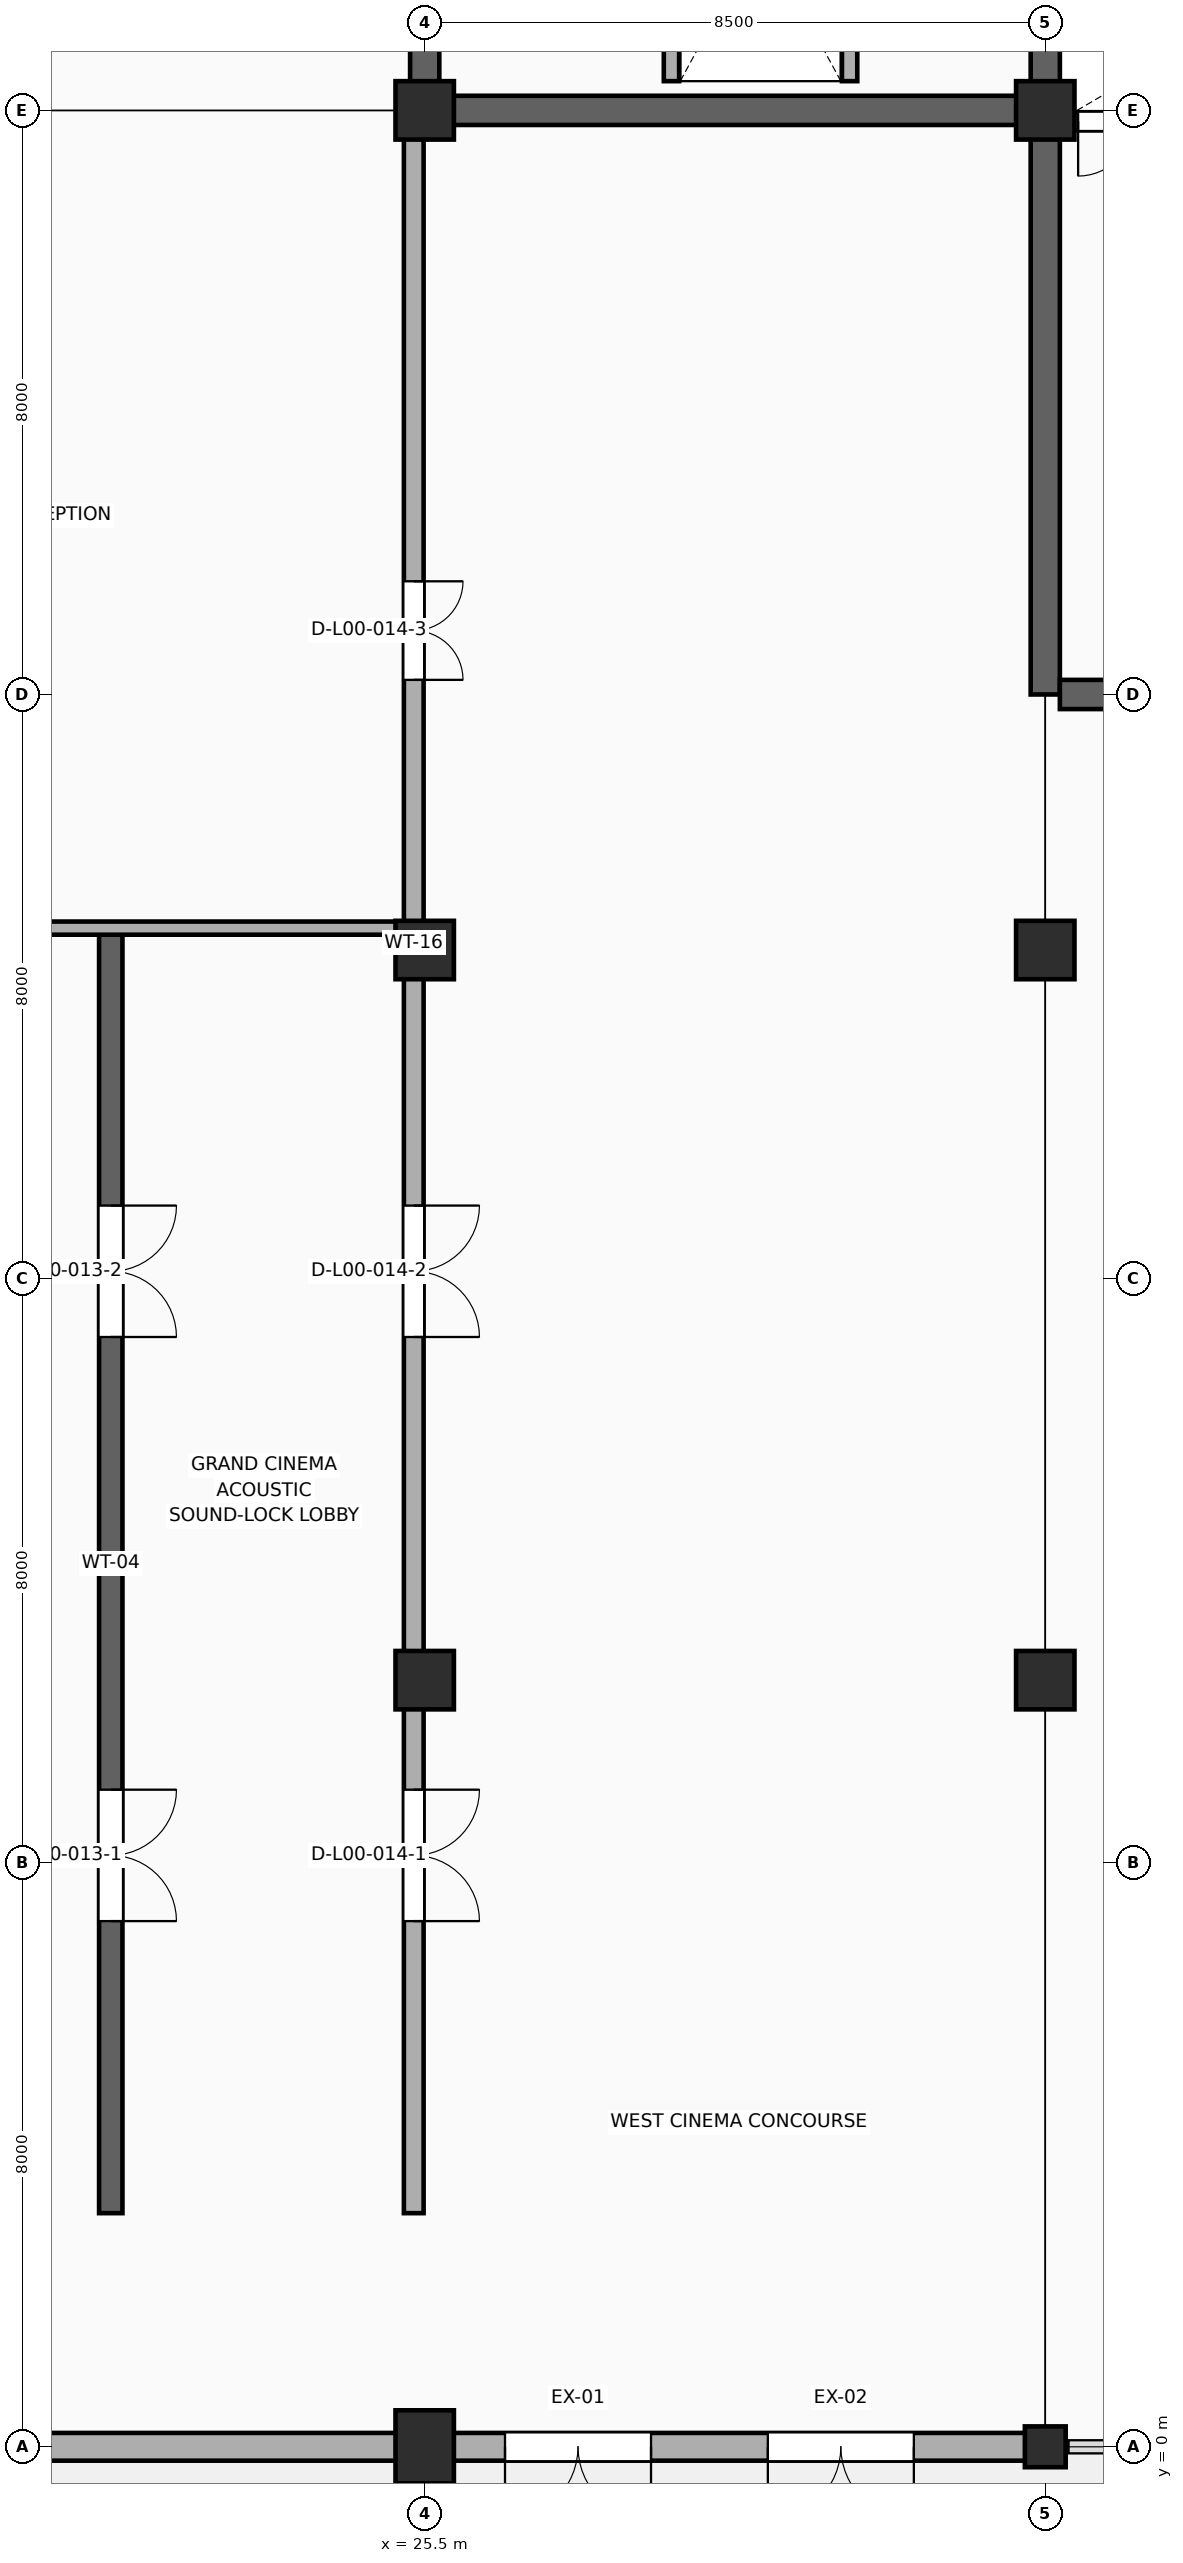
"""IFC4 building model, lengths in metres.
Left out: names, types, materials, properties, quantities, classifications, styles, units other than length and angle.
Written with IfcOpenShell. Run it as: python <this file> out.ifc"""

import sys

from ifc_helpers import new_model, si_unit, direction, frame, frame_2d, origin, origin_with_axes, origin_2d, place, context, subcontext, project, spatial, rectangle, hollow_circle, extrude, element, fill, save


model = new_model("IFC4")
c1 = context("Model", 3, precision=1e-05, world=origin(), true_north=direction((0.0, 1.0)))
c2 = subcontext(c1, "Body", "Model", "MODEL_VIEW")
j1 = project(units=[si_unit("LENGTHUNIT", "METRE"), si_unit("PLANEANGLEUNIT", "RADIAN")], contexts=[c1])
p1 = place(None, origin())
s1 = spatial("IfcSite", under=j1, at=p1, CompositionType="ELEMENT")
p2 = place(p1, origin())
s2 = spatial("IfcBuilding", under=s1, at=p2, CompositionType="ELEMENT")
p3 = place(p2, origin())
s3 = spatial("IfcBuildingStorey", under=s2, at=p3, CompositionType="ELEMENT", Elevation=0.0)
p4 = place(p3, frame((25.5, 32.0, 0.0), z_axis=(0.0, 0.0, 1.0), x_axis=(0.0, 1.0, 0.0)))
e1 = element("IfcWall", 1, at=p4, inside=s3, PredefinedType="SHEAR", context=c2, shape_type="SweptSolid", body=[
    extrude(rectangle(XDim=12.8, YDim=0.4, at=frame_2d((6.4, 0.0))), origin(), (0.0, 0.0, 1.0), 5.24),
])
p5 = place(p4, frame((1.25, 0.0, 0.0)))
e2 = element("IfcOpeningElement", 2, at=p5, cuts=e1, PredefinedType="OPENING", context=c2, shape_type="SweptSolid", body=[
    extrude(rectangle(XDim=1.05, YDim=2.15, at=frame_2d((0.525, 1.075))), frame((0.0, 0.212, 0.0), z_axis=(0.0, -1.0, 0.0), x_axis=(1.0, 0.0, 0.0)), (0.0, 0.0, 1.0), 0.424),
])
p6 = place(p3, frame((34.0, 32.0, 0.0), z_axis=(0.0, 0.0, 1.0), x_axis=(0.0, 1.0, 0.0)))
e3 = element("IfcWall", 3, at=p6, inside=s3, PredefinedType="SHEAR", context=c2, shape_type="SweptSolid", body=[
    extrude(rectangle(XDim=12.8, YDim=0.4, at=frame_2d((6.4, 0.0))), origin(), (0.0, 0.0, 1.0), 5.24),
])
p7 = place(p3, frame((25.7, 32.0, 0.0), z_axis=(0.0, 0.0, 1.0), x_axis=(1.0, 0.0, 0.0)))
e4 = element("IfcWall", 4, at=p7, inside=s3, PredefinedType="SHEAR", context=c2, shape_type="SweptSolid", body=[
    extrude(rectangle(XDim=8.1, YDim=0.4, at=frame_2d((4.05, 0.0))), origin(), (0.0, 0.0, 1.0), 5.24),
])
for number, where, z_axis, x_axis in (
    (5, (28.88, 32.4, 0.0), (0.0, 0.0, 1.0), (0.0, 1.0, 0.0)),
    (6, (31.32, 32.4, 0.0), (0.0, 0.0, 1.0), (0.0, 1.0, 0.0)),
):
    element("IfcWall", number, at=place(p3, frame(where, z_axis=z_axis, x_axis=x_axis)), inside=s3, PredefinedType="PARTITIONING", context=c2, shape_type="SweptSolid", body=[
        extrude(rectangle(XDim=4.05, YDim=0.21, at=frame_2d((2.025, 0.0))), origin(), (0.0, 0.0, 1.0), 5.24),
    ])
p8 = place(p3, frame((34.0, 24.0, 0.0), z_axis=(0.0, 0.0, 1.0), x_axis=(0.0, 1.0, 0.0)))
e7 = element("IfcWall", 7, at=p8, inside=s3, PredefinedType="SHEAR", context=c2, shape_type="SweptSolid", body=[
    extrude(rectangle(XDim=7.8, YDim=0.4, at=frame_2d((3.9, 0.0))), origin(), (0.0, 0.0, 1.0), 5.24),
])
p9 = place(p3, frame((34.2, 24.0, 0.0), z_axis=(0.0, 0.0, 1.0), x_axis=(1.0, 0.0, 0.0)))
e8 = element("IfcWall", 8, at=p9, inside=s3, PredefinedType="SHEAR", context=c2, shape_type="SweptSolid", body=[
    extrude(rectangle(XDim=8.1, YDim=0.4, at=frame_2d((4.05, 0.0))), origin(), (0.0, 0.0, 1.0), 5.24),
])
p10 = place(p9, frame((0.7, 0.0, 0.0)))
e9 = element("IfcOpeningElement", 9, at=p10, cuts=e8, PredefinedType="OPENING", context=c2, shape_type="SweptSolid", body=[
    extrude(rectangle(XDim=1.05, YDim=2.15, at=frame_2d((0.525, 1.075))), frame((0.0, 0.212, 0.0), z_axis=(0.0, -1.0, 0.0), x_axis=(1.0, 0.0, 0.0)), (0.0, 0.0, 1.0), 0.424),
])
p11 = place(p3, frame((34.25, 31.85, 0.0), z_axis=(0.0, 0.0, 1.0), x_axis=(1.0, 0.0, 0.0)))
e10 = element("IfcWall", 10, at=p11, inside=s3, PredefinedType="STANDARD", context=c2, shape_type="SweptSolid", body=[
    extrude(rectangle(XDim=8.0, YDim=0.25, at=frame_2d((4.0, 0.0))), origin(), (0.0, 0.0, 1.0), 5.24),
])
p12 = place(p11, frame((0.2, 0.0, 0.0)))
e11 = element("IfcOpeningElement", 11, at=p12, cuts=e10, PredefinedType="OPENING", context=c2, shape_type="SweptSolid", body=[
    extrude(rectangle(XDim=1.5, YDim=2.2, at=frame_2d((0.75, 1.1))), frame((0.0, 0.137, 0.0), z_axis=(0.0, -1.0, 0.0), x_axis=(1.0, 0.0, 0.0)), (0.0, 0.0, 1.0), 0.274),
])
p13 = place(p3, frame((25.5, 0.0, 0.0), z_axis=(0.0, 0.0, 1.0), x_axis=(1.0, 0.0, 0.0)))
e12 = element("IfcColumn", 12, at=p13, inside=s3, PredefinedType="COLUMN", context=c2, shape_type="SweptSolid", body=[
    extrude(rectangle(XDim=0.8, YDim=1.0, at=origin_2d()), origin(), (0.0, 0.0, 1.0), 5.14),
])
for number, where, z_axis, x_axis in (
    (13, (25.5, 10.5, 0.0), (0.0, 0.0, 1.0), (1.0, 0.0, 0.0)),
    (14, (25.5, 20.5, 0.0), (0.0, 0.0, 1.0), (1.0, 0.0, 0.0)),
    (15, (25.5, 32.0, 0.0), (0.0, 0.0, 1.0), (1.0, 0.0, 0.0)),
):
    element("IfcColumn", number, at=place(p3, frame(where, z_axis=z_axis, x_axis=x_axis)), inside=s3, PredefinedType="COLUMN", context=c2, shape_type="SweptSolid", body=[
        extrude(rectangle(XDim=0.8, YDim=0.8, at=origin_2d()), origin(), (0.0, 0.0, 1.0), 5.14),
    ])
p14 = place(p3, frame((34.0, 0.0, 0.0), z_axis=(0.0, 0.0, 1.0), x_axis=(1.0, 0.0, 0.0)))
e16 = element("IfcColumn", 16, at=p14, inside=s3, PredefinedType="COLUMN", context=c2, shape_type="SweptSolid", body=[
    extrude(hollow_circle(Radius=0.28, WallThickness=0.016, at=origin_2d()), origin(), (0.0, 0.0, 1.0), 5.14),
])
for number, where, z_axis, x_axis in (
    (17, (34.0, 10.5, 0.0), (0.0, 0.0, 1.0), (1.0, 0.0, 0.0)),
    (18, (34.0, 20.5, 0.0), (0.0, 0.0, 1.0), (1.0, 0.0, 0.0)),
    (19, (34.0, 32.0, 0.0), (0.0, 0.0, 1.0), (1.0, 0.0, 0.0)),
):
    element("IfcColumn", number, at=place(p3, frame(where, z_axis=z_axis, x_axis=x_axis)), inside=s3, PredefinedType="COLUMN", context=c2, shape_type="SweptSolid", body=[
        extrude(rectangle(XDim=0.8, YDim=0.8, at=origin_2d()), origin(), (0.0, 0.0, 1.0), 5.14),
    ])
p15 = place(p3, origin_with_axes())
e20 = element("IfcWall", 20, at=p15, inside=s3, PredefinedType="STANDARD", context=c2, shape_type="SweptSolid", body=[
    extrude(rectangle(XDim=34.0, YDim=0.38, at=frame_2d((17.0, 0.0))), origin(), (0.0, 0.0, 1.0), 4.28),
])
p16 = place(p15, frame((26.6, 0.0, 0.0)))
e21 = element("IfcOpeningElement", 21, at=p16, cuts=e20, PredefinedType="OPENING", context=c2, shape_type="SweptSolid", body=[
    extrude(rectangle(XDim=2.0, YDim=2.4, at=frame_2d((1.0, 1.2))), frame((0.0, 0.202, 0.0), z_axis=(0.0, -1.0, 0.0), x_axis=(1.0, 0.0, 0.0)), (0.0, 0.0, 1.0), 0.404),
])
p17 = place(p15, frame((30.2, 0.0, 0.0)))
e22 = element("IfcOpeningElement", 22, at=p17, cuts=e20, PredefinedType="OPENING", context=c2, shape_type="SweptSolid", body=[
    extrude(rectangle(XDim=2.0, YDim=2.4, at=frame_2d((1.0, 1.2))), frame((0.0, 0.202, 0.0), z_axis=(0.0, -1.0, 0.0), x_axis=(1.0, 0.0, 0.0)), (0.0, 0.0, 1.0), 0.404),
])
p18 = place(p15, frame((4.367, 0.0, 2.72)))
e23 = element("IfcOpeningElement", 23, at=p18, cuts=e20, PredefinedType="OPENING", context=c2, shape_type="SweptSolid", body=[
    extrude(rectangle(XDim=2.6, YDim=1.4, at=frame_2d((1.3, 0.7))), frame((0.0, 0.202, 0.0), z_axis=(0.0, -1.0, 0.0), x_axis=(1.0, 0.0, 0.0)), (0.0, 0.0, 1.0), 0.404),
])
p19 = place(p3, frame((21.2, 3.2, 0.0), z_axis=(0.0, 0.0, 1.0), x_axis=(0.0, 1.0, 0.0)))
e24 = element("IfcWall", 24, at=p19, inside=s3, PredefinedType="SHEAR", context=c2, shape_type="SweptSolid", body=[
    extrude(rectangle(XDim=17.6, YDim=0.32, at=frame_2d((8.8, 0.0))), origin(), (0.0, 0.0, 1.0), 5.1),
])
p20 = place(p19, frame((4.0, 0.0, 0.0)))
e25 = element("IfcOpeningElement", 25, at=p20, cuts=e24, PredefinedType="OPENING", context=c2, shape_type="SweptSolid", body=[
    extrude(rectangle(XDim=1.8, YDim=2.4, at=frame_2d((0.9, 1.2))), frame((0.0, 0.172, 0.0), z_axis=(0.0, -1.0, 0.0), x_axis=(1.0, 0.0, 0.0)), (0.0, 0.0, 1.0), 0.344),
])
p21 = place(p19, frame((12.0, 0.0, 0.0)))
e26 = element("IfcOpeningElement", 26, at=p21, cuts=e24, PredefinedType="OPENING", context=c2, shape_type="SweptSolid", body=[
    extrude(rectangle(XDim=1.8, YDim=2.4, at=frame_2d((0.9, 1.2))), frame((0.0, 0.172, 0.0), z_axis=(0.0, -1.0, 0.0), x_axis=(1.0, 0.0, 0.0)), (0.0, 0.0, 1.0), 0.344),
])
p22 = place(p3, frame((25.35, 3.2, 0.0), z_axis=(0.0, 0.0, 1.0), x_axis=(0.0, 1.0, 0.0)))
e27 = element("IfcWall", 27, at=p22, inside=s3, PredefinedType="PARTITIONING", context=c2, shape_type="SweptSolid", body=[
    extrude(rectangle(XDim=28.6, YDim=0.27, at=frame_2d((14.3, 0.0))), origin(), (0.0, 0.0, 1.0), 4.03),
])
p23 = place(p22, frame((4.0, 0.0, 0.0)))
e28 = element("IfcOpeningElement", 28, at=p23, cuts=e27, PredefinedType="OPENING", context=c2, shape_type="SweptSolid", body=[
    extrude(rectangle(XDim=1.8, YDim=2.4, at=frame_2d((0.9, 1.2))), frame((0.0, 0.147, 0.0), z_axis=(0.0, -1.0, 0.0), x_axis=(1.0, 0.0, 0.0)), (0.0, 0.0, 1.0), 0.294),
])
p24 = place(p22, frame((12.0, 0.0, 0.0)))
e29 = element("IfcOpeningElement", 29, at=p24, cuts=e27, PredefinedType="OPENING", context=c2, shape_type="SweptSolid", body=[
    extrude(rectangle(XDim=1.8, YDim=2.4, at=frame_2d((0.9, 1.2))), frame((0.0, 0.147, 0.0), z_axis=(0.0, -1.0, 0.0), x_axis=(1.0, 0.0, 0.0)), (0.0, 0.0, 1.0), 0.294),
])
p25 = place(p22, frame((21.0, 0.0, 0.0)))
e30 = element("IfcOpeningElement", 30, at=p25, cuts=e27, PredefinedType="OPENING", context=c2, shape_type="SweptSolid", body=[
    extrude(rectangle(XDim=1.35, YDim=2.25, at=frame_2d((0.675, 1.125))), frame((0.0, 0.147, 0.0), z_axis=(0.0, -1.0, 0.0), x_axis=(1.0, 0.0, 0.0)), (0.0, 0.0, 1.0), 0.294),
])
p26 = place(p3, frame((0.4, 20.8, 0.0), z_axis=(0.0, 0.0, 1.0), x_axis=(1.0, 0.0, 0.0)))
e31 = element("IfcWall", 31, at=p26, inside=s3, PredefinedType="PARTITIONING", context=c2, shape_type="SweptSolid", body=[
    extrude(rectangle(XDim=24.8, YDim=0.18, at=frame_2d((12.4, 0.0))), origin(), (0.0, 0.0, 1.0), 4.18),
])
p27 = place(p26, frame((6.0, 0.0, 0.0)))
e32 = element("IfcOpeningElement", 32, at=p27, cuts=e31, PredefinedType="OPENING", context=c2, shape_type="SweptSolid", body=[
    extrude(rectangle(XDim=1.25, YDim=2.25, at=frame_2d((0.625, 1.125))), frame((0.0, 0.102, 0.0), z_axis=(0.0, -1.0, 0.0), x_axis=(1.0, 0.0, 0.0)), (0.0, 0.0, 1.0), 0.204),
])
p28 = place(p12, frame((1.5, 0.0, 0.0), z_axis=(0.0, 0.0, 1.0), x_axis=(-1.0, 0.0, 0.0)))
e33 = element("IfcDoor", 33, at=p28, inside=s3, OperationType="DOUBLE_DOOR_SINGLE_SWING", PredefinedType="DOOR", context=c2, shape_type="SweptSolid", body=[
    extrude(rectangle(XDim=1.5, YDim=2.2, at=frame_2d((0.75, 1.1))), frame((0.0, 0.025, 0.0), z_axis=(0.0, -1.0, 0.0), x_axis=(1.0, 0.0, 0.0)), (0.0, 0.0, 1.0), 0.05),
])
fill(e11, e33)
p29 = place(p16, frame((2.0, 0.0, 0.0), z_axis=(0.0, 0.0, 1.0), x_axis=(-1.0, 0.0, 0.0)))
e34 = element("IfcDoor", 34, at=p29, inside=s3, OperationType="DOUBLE_DOOR_SINGLE_SWING", PredefinedType="DOOR", context=c2, shape_type="SweptSolid", body=[
    extrude(rectangle(XDim=2.0, YDim=2.4, at=frame_2d((1.0, 1.2))), frame((0.0, 0.025, 0.0), z_axis=(0.0, -1.0, 0.0), x_axis=(1.0, 0.0, 0.0)), (0.0, 0.0, 1.0), 0.05),
])
fill(e21, e34)
p30 = place(p17, frame((2.0, 0.0, 0.0), z_axis=(0.0, 0.0, 1.0), x_axis=(-1.0, 0.0, 0.0)))
e35 = element("IfcDoor", 35, at=p30, inside=s3, OperationType="DOUBLE_DOOR_SINGLE_SWING", PredefinedType="DOOR", context=c2, shape_type="SweptSolid", body=[
    extrude(rectangle(XDim=2.0, YDim=2.4, at=frame_2d((1.0, 1.2))), frame((0.0, 0.025, 0.0), z_axis=(0.0, -1.0, 0.0), x_axis=(1.0, 0.0, 0.0)), (0.0, 0.0, 1.0), 0.05),
])
fill(e22, e35)
p31 = place(p20, frame((1.8, 0.0, 0.0), z_axis=(0.0, 0.0, 1.0), x_axis=(-1.0, 0.0, 0.0)))
e36 = element("IfcDoor", 36, at=p31, inside=s3, OperationType="DOUBLE_DOOR_SINGLE_SWING", PredefinedType="DOOR", context=c2, shape_type="SweptSolid", body=[
    extrude(rectangle(XDim=1.8, YDim=2.4, at=frame_2d((0.9, 1.2))), frame((0.0, 0.025, 0.0), z_axis=(0.0, -1.0, 0.0), x_axis=(1.0, 0.0, 0.0)), (0.0, 0.0, 1.0), 0.05),
])
fill(e25, e36)
p32 = place(p21, frame((1.8, 0.0, 0.0), z_axis=(0.0, 0.0, 1.0), x_axis=(-1.0, 0.0, 0.0)))
e37 = element("IfcDoor", 37, at=p32, inside=s3, OperationType="DOUBLE_DOOR_SINGLE_SWING", PredefinedType="DOOR", context=c2, shape_type="SweptSolid", body=[
    extrude(rectangle(XDim=1.8, YDim=2.4, at=frame_2d((0.9, 1.2))), frame((0.0, 0.025, 0.0), z_axis=(0.0, -1.0, 0.0), x_axis=(1.0, 0.0, 0.0)), (0.0, 0.0, 1.0), 0.05),
])
fill(e26, e37)
p33 = place(p23, frame((1.8, 0.0, 0.0), z_axis=(0.0, 0.0, 1.0), x_axis=(-1.0, 0.0, 0.0)))
e38 = element("IfcDoor", 38, at=p33, inside=s3, OperationType="DOUBLE_DOOR_SINGLE_SWING", PredefinedType="DOOR", context=c2, shape_type="SweptSolid", body=[
    extrude(rectangle(XDim=1.8, YDim=2.4, at=frame_2d((0.9, 1.2))), frame((0.0, 0.025, 0.0), z_axis=(0.0, -1.0, 0.0), x_axis=(1.0, 0.0, 0.0)), (0.0, 0.0, 1.0), 0.05),
])
fill(e28, e38)
p34 = place(p24, frame((1.8, 0.0, 0.0), z_axis=(0.0, 0.0, 1.0), x_axis=(-1.0, 0.0, 0.0)))
e39 = element("IfcDoor", 39, at=p34, inside=s3, OperationType="DOUBLE_DOOR_SINGLE_SWING", PredefinedType="DOOR", context=c2, shape_type="SweptSolid", body=[
    extrude(rectangle(XDim=1.8, YDim=2.4, at=frame_2d((0.9, 1.2))), frame((0.0, 0.025, 0.0), z_axis=(0.0, -1.0, 0.0), x_axis=(1.0, 0.0, 0.0)), (0.0, 0.0, 1.0), 0.05),
])
fill(e29, e39)
p35 = place(p25, frame((1.35, 0.0, 0.0), z_axis=(0.0, 0.0, 1.0), x_axis=(-1.0, 0.0, 0.0)))
e40 = element("IfcDoor", 40, at=p35, inside=s3, OperationType="DOUBLE_DOOR_SINGLE_SWING", PredefinedType="DOOR", context=c2, shape_type="SweptSolid", body=[
    extrude(rectangle(XDim=1.35, YDim=2.25, at=frame_2d((0.675, 1.125))), frame((0.0, 0.025, 0.0), z_axis=(0.0, -1.0, 0.0), x_axis=(1.0, 0.0, 0.0)), (0.0, 0.0, 1.0), 0.05),
])
fill(e30, e40)
save(model, sys.argv[1])
